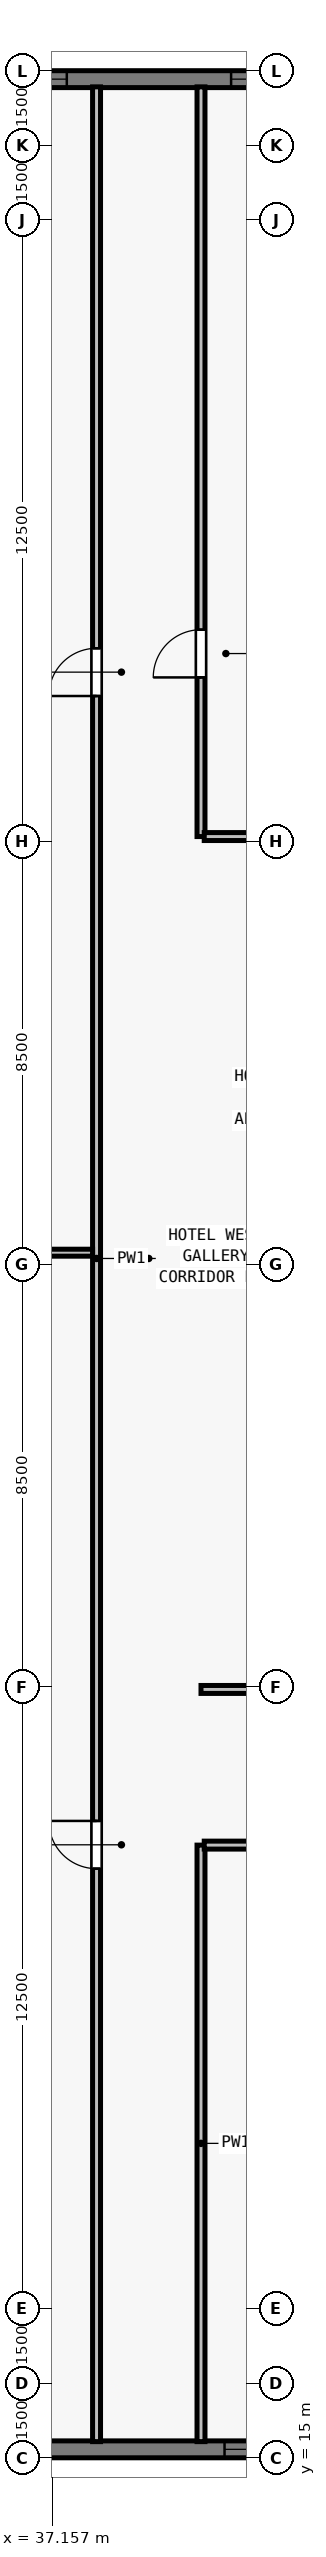
"""IFC4 building model, lengths in metres.
Left out: names, types, materials, properties, quantities, classifications, styles, units other than length and angle.
Written with IfcOpenShell. Run it as: python <this file> out.ifc"""

import sys

from ifc_helpers import new_model, si_unit, direction, frame, frame_2d, origin, place, context, subcontext, project, spatial, rectangle, extrude, element, fill, save


model = new_model("IFC4")
c1 = context("Model", 3, precision=1e-05, world=origin(), true_north=direction((0.0, 1.0)))
c2 = subcontext(c1, "Body", "Model", "MODEL_VIEW")
j1 = project(units=[si_unit("LENGTHUNIT", "METRE"), si_unit("PLANEANGLEUNIT", "RADIAN")], contexts=[c1])
p1 = place(None, origin())
s1 = spatial("IfcSite", under=j1, at=p1, CompositionType="ELEMENT")
p2 = place(p1, origin())
s2 = spatial("IfcBuilding", under=s1, at=p2, CompositionType="ELEMENT")
p3 = place(p2, frame((0.0, 0.0, 183.0)))
s3 = spatial("IfcBuildingStorey", under=s2, at=p3, CompositionType="ELEMENT", Elevation=183.0)
p4 = place(p3, frame((72.0, 15.17, 0.0), z_axis=(0.0, 0.0, 1.0), x_axis=(-1.0, 0.0, 0.0)))
e1 = element("IfcWall", 1, at=p4, inside=s3, PredefinedType="SOLIDWALL", context=c2, shape_type="SweptSolid", body=[
    extrude(rectangle(XDim=39.682, YDim=0.34, at=frame_2d((19.841, 0.0))), origin(), (0.0, 0.0, 1.0), 3.28),
])
p5 = place(p4, frame((5.802, 0.0, 0.8)))
e2 = element("IfcOpeningElement", 2, at=p5, cuts=e1, PredefinedType="OPENING", context=c2, shape_type="SweptSolid", body=[
    extrude(rectangle(XDim=1.35, YDim=1.66, at=frame_2d((0.675, 0.83))), frame((0.0, 0.18, 0.0), z_axis=(0.0, -1.0, 0.0), x_axis=(1.0, 0.0, 0.0)), (0.0, 0.0, 1.0), 0.36),
])
p6 = place(p4, frame((12.059, 0.0, 0.8)))
e3 = element("IfcOpeningElement", 3, at=p6, cuts=e1, PredefinedType="OPENING", context=c2, shape_type="SweptSolid", body=[
    extrude(rectangle(XDim=1.35, YDim=1.66, at=frame_2d((0.675, 0.83))), frame((0.0, 0.18, 0.0), z_axis=(0.0, -1.0, 0.0), x_axis=(1.0, 0.0, 0.0)), (0.0, 0.0, 1.0), 0.36),
])
p7 = place(p4, frame((19.166, 0.0, 0.8)))
e4 = element("IfcOpeningElement", 4, at=p7, cuts=e1, PredefinedType="OPENING", context=c2, shape_type="SweptSolid", body=[
    extrude(rectangle(XDim=1.35, YDim=1.66, at=frame_2d((0.675, 0.83))), frame((0.0, 0.18, 0.0), z_axis=(0.0, -1.0, 0.0), x_axis=(1.0, 0.0, 0.0)), (0.0, 0.0, 1.0), 0.36),
])
p8 = place(p4, frame((21.67, 0.0, 0.8)))
e5 = element("IfcOpeningElement", 5, at=p8, cuts=e1, PredefinedType="OPENING", context=c2, shape_type="SweptSolid", body=[
    extrude(rectangle(XDim=1.75, YDim=1.66, at=frame_2d((0.875, 0.83))), frame((0.0, 0.18, 0.0), z_axis=(0.0, -1.0, 0.0), x_axis=(1.0, 0.0, 0.0)), (0.0, 0.0, 1.0), 0.36),
])
p9 = place(p4, frame((26.273, 0.0, 0.8)))
e6 = element("IfcOpeningElement", 6, at=p9, cuts=e1, PredefinedType="OPENING", context=c2, shape_type="SweptSolid", body=[
    extrude(rectangle(XDim=1.35, YDim=1.66, at=frame_2d((0.675, 0.83))), frame((0.0, 0.18, 0.0), z_axis=(0.0, -1.0, 0.0), x_axis=(1.0, 0.0, 0.0)), (0.0, 0.0, 1.0), 0.36),
])
p10 = place(p4, frame((29.627, 0.0, 0.8)))
e7 = element("IfcOpeningElement", 7, at=p10, cuts=e1, PredefinedType="OPENING", context=c2, shape_type="SweptSolid", body=[
    extrude(rectangle(XDim=1.75, YDim=1.66, at=frame_2d((0.875, 0.83))), frame((0.0, 0.18, 0.0), z_axis=(0.0, -1.0, 0.0), x_axis=(1.0, 0.0, 0.0)), (0.0, 0.0, 1.0), 0.36),
])
p11 = place(p3, frame((32.0, 62.83, 0.0), z_axis=(0.0, 0.0, 1.0), x_axis=(1.0, 0.0, 0.0)))
e8 = element("IfcWall", 8, at=p11, inside=s3, PredefinedType="SOLIDWALL", context=c2, shape_type="SweptSolid", body=[
    extrude(rectangle(XDim=39.682, YDim=0.34, at=frame_2d((19.841, 0.0))), origin(), (0.0, 0.0, 1.0), 3.28),
])
p12 = place(p11, frame((4.102, 0.0, 0.8)))
e9 = element("IfcOpeningElement", 9, at=p12, cuts=e8, PredefinedType="OPENING", context=c2, shape_type="SweptSolid", body=[
    extrude(rectangle(XDim=1.35, YDim=1.66, at=frame_2d((0.675, 0.83))), frame((0.0, 0.18, 0.0), z_axis=(0.0, -1.0, 0.0), x_axis=(1.0, 0.0, 0.0)), (0.0, 0.0, 1.0), 0.36),
])
p13 = place(p11, frame((8.755, 0.0, 0.8)))
e10 = element("IfcOpeningElement", 10, at=p13, cuts=e8, PredefinedType="OPENING", context=c2, shape_type="SweptSolid", body=[
    extrude(rectangle(XDim=1.75, YDim=1.66, at=frame_2d((0.875, 0.83))), frame((0.0, 0.18, 0.0), z_axis=(0.0, -1.0, 0.0), x_axis=(1.0, 0.0, 0.0)), (0.0, 0.0, 1.0), 0.36),
])
p14 = place(p11, frame((12.059, 0.0, 0.8)))
e11 = element("IfcOpeningElement", 11, at=p14, cuts=e8, PredefinedType="OPENING", context=c2, shape_type="SweptSolid", body=[
    extrude(rectangle(XDim=1.35, YDim=1.66, at=frame_2d((0.675, 0.83))), frame((0.0, 0.18, 0.0), z_axis=(0.0, -1.0, 0.0), x_axis=(1.0, 0.0, 0.0)), (0.0, 0.0, 1.0), 0.36),
])
p15 = place(p11, frame((16.262, 0.0, 0.8)))
e12 = element("IfcOpeningElement", 12, at=p15, cuts=e8, PredefinedType="OPENING", context=c2, shape_type="SweptSolid", body=[
    extrude(rectangle(XDim=1.75, YDim=1.66, at=frame_2d((0.875, 0.83))), frame((0.0, 0.18, 0.0), z_axis=(0.0, -1.0, 0.0), x_axis=(1.0, 0.0, 0.0)), (0.0, 0.0, 1.0), 0.36),
])
p16 = place(p11, frame((18.316, 0.0, 0.8)))
e13 = element("IfcOpeningElement", 13, at=p16, cuts=e8, PredefinedType="OPENING", context=c2, shape_type="SweptSolid", body=[
    extrude(rectangle(XDim=1.35, YDim=1.66, at=frame_2d((0.675, 0.83))), frame((0.0, 0.18, 0.0), z_axis=(0.0, -1.0, 0.0), x_axis=(1.0, 0.0, 0.0)), (0.0, 0.0, 1.0), 0.36),
])
p17 = place(p11, frame((22.07, 0.0, 0.8)))
e14 = element("IfcOpeningElement", 14, at=p17, cuts=e8, PredefinedType="OPENING", context=c2, shape_type="SweptSolid", body=[
    extrude(rectangle(XDim=1.75, YDim=1.66, at=frame_2d((0.875, 0.83))), frame((0.0, 0.18, 0.0), z_axis=(0.0, -1.0, 0.0), x_axis=(1.0, 0.0, 0.0)), (0.0, 0.0, 1.0), 0.36),
])
p18 = place(p11, frame((26.273, 0.0, 0.8)))
e15 = element("IfcOpeningElement", 15, at=p18, cuts=e8, PredefinedType="OPENING", context=c2, shape_type="SweptSolid", body=[
    extrude(rectangle(XDim=1.35, YDim=1.66, at=frame_2d((0.675, 0.83))), frame((0.0, 0.18, 0.0), z_axis=(0.0, -1.0, 0.0), x_axis=(1.0, 0.0, 0.0)), (0.0, 0.0, 1.0), 0.36),
])
p19 = place(p11, frame((33.38, 0.0, 0.8)))
e16 = element("IfcOpeningElement", 16, at=p19, cuts=e8, PredefinedType="OPENING", context=c2, shape_type="SweptSolid", body=[
    extrude(rectangle(XDim=1.35, YDim=1.66, at=frame_2d((0.675, 0.83))), frame((0.0, 0.18, 0.0), z_axis=(0.0, -1.0, 0.0), x_axis=(1.0, 0.0, 0.0)), (0.0, 0.0, 1.0), 0.36),
])
p20 = place(p3, frame((38.05, 15.325, 0.0), z_axis=(0.0, 0.0, 1.0), x_axis=(0.0, 1.0, 0.0)))
e17 = element("IfcWall", 17, at=p20, inside=s3, PredefinedType="PARTITIONING", context=c2, shape_type="SweptSolid", body=[
    extrude(rectangle(XDim=47.35, YDim=0.16, at=frame_2d((23.675, 0.0))), origin(), (0.0, 0.0, 1.0), 2.555),
])
p21 = place(p20, frame((11.521, 0.0, 0.0)))
e18 = element("IfcOpeningElement", 18, at=p21, cuts=e17, PredefinedType="OPENING", context=c2, shape_type="SweptSolid", body=[
    extrude(rectangle(XDim=0.96, YDim=2.12, at=frame_2d((0.48, 1.06))), frame((0.0, 0.09, 0.0), z_axis=(0.0, -1.0, 0.0), x_axis=(1.0, 0.0, 0.0)), (0.0, 0.0, 1.0), 0.18),
])
p22 = place(p20, frame((35.101, 0.0, 0.0)))
e19 = element("IfcOpeningElement", 19, at=p22, cuts=e17, PredefinedType="OPENING", context=c2, shape_type="SweptSolid", body=[
    extrude(rectangle(XDim=0.96, YDim=2.12, at=frame_2d((0.48, 1.06))), frame((0.0, 0.09, 0.0), z_axis=(0.0, -1.0, 0.0), x_axis=(1.0, 0.0, 0.0)), (0.0, 0.0, 1.0), 0.18),
])
p23 = place(p3, frame((40.15, 15.325, 0.0), z_axis=(0.0, 0.0, 1.0), x_axis=(0.0, 1.0, 0.0)))
e20 = element("IfcWall", 20, at=p23, inside=s3, PredefinedType="PARTITIONING", context=c2, shape_type="SweptSolid", body=[
    extrude(rectangle(XDim=11.995, YDim=0.16, at=frame_2d((5.998, 0.0))), origin(), (0.0, 0.0, 1.0), 2.555),
])
p24 = place(p3, frame((40.15, 47.6, 0.0), z_axis=(0.0, 0.0, 1.0), x_axis=(0.0, 1.0, 0.0)))
e21 = element("IfcWall", 21, at=p24, inside=s3, PredefinedType="PARTITIONING", context=c2, shape_type="SweptSolid", body=[
    extrude(rectangle(XDim=15.075, YDim=0.16, at=frame_2d((7.538, 0.0))), origin(), (0.0, 0.0, 1.0), 2.555),
])
p25 = place(p24, frame((3.2, 0.0, 0.0)))
e22 = element("IfcOpeningElement", 22, at=p25, cuts=e21, PredefinedType="OPENING", context=c2, shape_type="SweptSolid", body=[
    extrude(rectangle(XDim=0.96, YDim=2.12, at=frame_2d((0.48, 1.06))), frame((0.0, 0.09, 0.0), z_axis=(0.0, -1.0, 0.0), x_axis=(1.0, 0.0, 0.0)), (0.0, 0.0, 1.0), 0.18),
])
p26 = place(p3, frame((40.15, 30.45, 0.0), z_axis=(0.0, 0.0, 1.0), x_axis=(1.0, 0.0, 0.0)))
e23 = element("IfcWall", 23, at=p26, inside=s3, PredefinedType="PARTITIONING", context=c2, shape_type="SweptSolid", body=[
    extrude(rectangle(XDim=3.085, YDim=0.16, at=frame_2d((1.542, 0.0))), origin(), (0.0, 0.0, 1.0), 3.28),
])
p27 = place(p3, frame((40.215, 47.6, 0.0), z_axis=(0.0, 0.0, 1.0), x_axis=(1.0, 0.0, 0.0)))
e24 = element("IfcWall", 24, at=p27, inside=s3, PredefinedType="PARTITIONING", context=c2, shape_type="SweptSolid", body=[
    extrude(rectangle(XDim=3.02, YDim=0.16, at=frame_2d((1.51, 0.0))), origin(), (0.0, 0.0, 1.0), 3.28),
])
p28 = place(p3, frame((40.215, 27.32, 0.0), z_axis=(0.0, 0.0, 1.0), x_axis=(1.0, 0.0, 0.0)))
e25 = element("IfcWall", 25, at=p28, inside=s3, PredefinedType="PARTITIONING", context=c2, shape_type="SweptSolid", body=[
    extrude(rectangle(XDim=22.07, YDim=0.16, at=frame_2d((11.035, 0.0))), origin(), (0.0, 0.0, 1.0), 3.28),
])
p29 = place(p28, frame((3.587, 0.0, 0.0)))
e26 = element("IfcOpeningElement", 26, at=p29, cuts=e25, PredefinedType="OPENING", context=c2, shape_type="SweptSolid", body=[
    extrude(rectangle(XDim=0.96, YDim=2.12, at=frame_2d((0.48, 1.06))), frame((0.0, 0.09, 0.0), z_axis=(0.0, -1.0, 0.0), x_axis=(1.0, 0.0, 0.0)), (0.0, 0.0, 1.0), 0.18),
])
p30 = place(p28, frame((10.61, 0.0, 0.0)))
e27 = element("IfcOpeningElement", 27, at=p30, cuts=e25, PredefinedType="OPENING", context=c2, shape_type="SweptSolid", body=[
    extrude(rectangle(XDim=0.96, YDim=2.12, at=frame_2d((0.48, 1.06))), frame((0.0, 0.09, 0.0), z_axis=(0.0, -1.0, 0.0), x_axis=(1.0, 0.0, 0.0)), (0.0, 0.0, 1.0), 0.18),
])
p31 = place(p28, frame((17.578, 0.0, 0.0)))
e28 = element("IfcOpeningElement", 28, at=p31, cuts=e25, PredefinedType="OPENING", context=c2, shape_type="SweptSolid", body=[
    extrude(rectangle(XDim=0.96, YDim=2.12, at=frame_2d((0.48, 1.06))), frame((0.0, 0.09, 0.0), z_axis=(0.0, -1.0, 0.0), x_axis=(1.0, 0.0, 0.0)), (0.0, 0.0, 1.0), 0.18),
])
p32 = place(p3, frame((28.42, 39.232, 0.0), z_axis=(0.0, 0.0, 1.0), x_axis=(1.0, 0.0, 0.0)))
e29 = element("IfcWall", 29, at=p32, inside=s3, PredefinedType="PARTITIONING", context=c2, shape_type="SweptSolid", body=[
    extrude(rectangle(XDim=9.55, YDim=0.14, at=frame_2d((4.775, 0.0))), origin(), (0.0, 0.0, 1.0), 2.896),
])
p33 = place(p10, origin())
e30 = element("IfcWindow", 30, at=p33, inside=s3, PartitioningType="SINGLE_PANEL", PredefinedType="WINDOW", context=c2, shape_type="SweptSolid", body=[
    extrude(rectangle(XDim=1.75, YDim=1.66, at=frame_2d((0.875, 0.83))), frame((0.0, -0.05, 0.0), z_axis=(0.0, -1.0, 0.0), x_axis=(1.0, 0.0, 0.0)), (0.0, 0.0, 1.0), 0.06),
])
fill(e7, e30)
p34 = place(p12, origin())
e31 = element("IfcWindow", 31, at=p34, inside=s3, PartitioningType="SINGLE_PANEL", PredefinedType="WINDOW", context=c2, shape_type="SweptSolid", body=[
    extrude(rectangle(XDim=1.35, YDim=1.66, at=frame_2d((0.675, 0.83))), frame((0.0, -0.05, 0.0), z_axis=(0.0, -1.0, 0.0), x_axis=(1.0, 0.0, 0.0)), (0.0, 0.0, 1.0), 0.06),
])
fill(e9, e31)
p35 = place(p13, origin())
e32 = element("IfcWindow", 32, at=p35, inside=s3, PartitioningType="SINGLE_PANEL", PredefinedType="WINDOW", context=c2, shape_type="SweptSolid", body=[
    extrude(rectangle(XDim=1.75, YDim=1.66, at=frame_2d((0.875, 0.83))), frame((0.0, -0.05, 0.0), z_axis=(0.0, -1.0, 0.0), x_axis=(1.0, 0.0, 0.0)), (0.0, 0.0, 1.0), 0.06),
])
fill(e10, e32)
p36 = place(p25, origin())
e33 = element("IfcDoor", 33, at=p36, inside=s3, OperationType="SINGLE_SWING_LEFT", PredefinedType="DOOR", context=c2, shape_type="SweptSolid", body=[
    extrude(rectangle(XDim=0.96, YDim=2.12, at=frame_2d((0.48, 1.06))), frame((0.0, 0.025, 0.0), z_axis=(0.0, -1.0, 0.0), x_axis=(1.0, 0.0, 0.0)), (0.0, 0.0, 1.0), 0.05),
])
fill(e22, e33)
p37 = place(p21, origin())
e34 = element("IfcDoor", 34, at=p37, inside=s3, OperationType="SINGLE_SWING_RIGHT", PredefinedType="DOOR", context=c2, shape_type="SweptSolid", body=[
    extrude(rectangle(XDim=0.96, YDim=2.12, at=frame_2d((0.48, 1.06))), frame((0.0, 0.025, 0.0), z_axis=(0.0, -1.0, 0.0), x_axis=(1.0, 0.0, 0.0)), (0.0, 0.0, 1.0), 0.05),
])
fill(e18, e34)
p38 = place(p22, origin())
e35 = element("IfcDoor", 35, at=p38, inside=s3, OperationType="SINGLE_SWING_LEFT", PredefinedType="DOOR", context=c2, shape_type="SweptSolid", body=[
    extrude(rectangle(XDim=0.96, YDim=2.12, at=frame_2d((0.48, 1.06))), frame((0.0, 0.025, 0.0), z_axis=(0.0, -1.0, 0.0), x_axis=(1.0, 0.0, 0.0)), (0.0, 0.0, 1.0), 0.05),
])
fill(e19, e35)
save(model, sys.argv[1])
